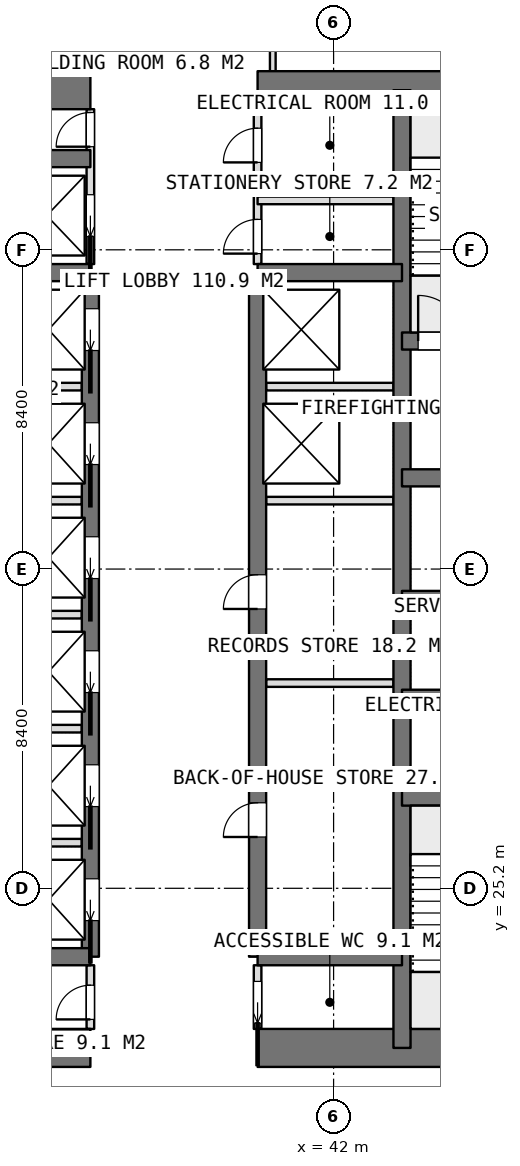
"""IFC4 building model, lengths in metres.
Left out: names, types, materials, properties, quantities, classifications, styles, units other than length and angle.
Written with IfcOpenShell. Run it as: python <this file> out.ifc"""

import sys

from ifc_helpers import new_model, si_unit, direction, frame, frame_2d, origin, place, context, subcontext, project, spatial, rectangle, extrude, element, fill, save


model = new_model("IFC4")
c1 = context("Model", 3, precision=1e-05, world=origin(), true_north=direction((0.0, 1.0)))
c2 = subcontext(c1, "Body", "Model", "MODEL_VIEW")
j1 = project(units=[si_unit("LENGTHUNIT", "METRE"), si_unit("PLANEANGLEUNIT", "RADIAN")], contexts=[c1])
p1 = place(None, origin())
s1 = spatial("IfcSite", under=j1, at=p1, CompositionType="ELEMENT")
p2 = place(p1, origin())
s2 = spatial("IfcBuilding", under=s1, at=p2, CompositionType="ELEMENT")
p3 = place(p2, frame((0.0, 0.0, 191.45)))
s3 = spatial("IfcBuildingStorey", under=s2, at=p3, CompositionType="ELEMENT", Elevation=191.45)
p4 = place(p3, frame((25.2, 21.0, 0.0), z_axis=(0.0, 0.0, 1.0), x_axis=(1.0, 0.0, 0.0)))
e1 = element("IfcWall", 1, at=p4, inside=s3, PredefinedType="SHEAR", context=c2, shape_type="SweptSolid", body=[
    extrude(rectangle(XDim=10.4, YDim=1.0, at=frame_2d((5.2, 0.0))), origin(), (0.0, 0.0, 1.0), 3.75),
])
p5 = place(p3, frame((40.0, 21.0, 0.0), z_axis=(0.0, 0.0, 1.0), x_axis=(1.0, 0.0, 0.0)))
e2 = element("IfcWall", 2, at=p5, inside=s3, PredefinedType="SHEAR", context=c2, shape_type="SweptSolid", body=[
    extrude(rectangle(XDim=10.4, YDim=1.0, at=frame_2d((5.2, 0.0))), origin(), (0.0, 0.0, 1.0), 3.75),
])
p6 = place(p3, frame((25.2, 46.2, 0.0), z_axis=(0.0, 0.0, 1.0), x_axis=(1.0, 0.0, 0.0)))
e3 = element("IfcWall", 3, at=p6, inside=s3, PredefinedType="SHEAR", context=c2, shape_type="SweptSolid", body=[
    extrude(rectangle(XDim=10.4, YDim=1.0, at=frame_2d((5.2, 0.0))), origin(), (0.0, 0.0, 1.0), 3.75),
])
p7 = place(p3, frame((40.0, 46.2, 0.0), z_axis=(0.0, 0.0, 1.0), x_axis=(1.0, 0.0, 0.0)))
e4 = element("IfcWall", 4, at=p7, inside=s3, PredefinedType="SHEAR", context=c2, shape_type="SweptSolid", body=[
    extrude(rectangle(XDim=10.4, YDim=1.0, at=frame_2d((5.2, 0.0))), origin(), (0.0, 0.0, 1.0), 3.75),
])
p8 = place(p3, frame((43.8, 21.0, 0.0), z_axis=(0.0, 0.0, 1.0), x_axis=(0.0, 1.0, 0.0)))
e5 = element("IfcWall", 5, at=p8, inside=s3, PredefinedType="SHEAR", context=c2, shape_type="SweptSolid", body=[
    extrude(rectangle(XDim=25.2, YDim=0.45, at=frame_2d((12.6, 0.0))), origin(), (0.0, 0.0, 1.0), 3.75),
])
p9 = place(p3, frame((35.6, 23.4, 0.0), z_axis=(0.0, 0.0, 1.0), x_axis=(0.0, 1.0, 0.0)))
e6 = element("IfcWall", 6, at=p9, inside=s3, PredefinedType="SHEAR", context=c2, shape_type="SweptSolid", body=[
    extrude(rectangle(XDim=18.0, YDim=0.45, at=frame_2d((9.0, 0.0))), origin(), (0.0, 0.0, 1.0), 3.75),
])
p10 = place(p9, frame((0.95, 0.0, 0.0)))
e7 = element("IfcOpeningElement", 7, at=p10, cuts=e6, PredefinedType="OPENING", context=c2, shape_type="SweptSolid", body=[
    extrude(rectangle(XDim=1.1, YDim=2.1, at=frame_2d((0.55, 1.05))), frame((0.0, 0.235, 0.0), z_axis=(0.0, -1.0, 0.0), x_axis=(1.0, 0.0, 0.0)), (0.0, 0.0, 1.0), 0.47),
])
p11 = place(p9, frame((3.95, 0.0, 0.0)))
e8 = element("IfcOpeningElement", 8, at=p11, cuts=e6, PredefinedType="OPENING", context=c2, shape_type="SweptSolid", body=[
    extrude(rectangle(XDim=1.1, YDim=2.1, at=frame_2d((0.55, 1.05))), frame((0.0, 0.235, 0.0), z_axis=(0.0, -1.0, 0.0), x_axis=(1.0, 0.0, 0.0)), (0.0, 0.0, 1.0), 0.47),
])
p12 = place(p9, frame((6.95, 0.0, 0.0)))
e9 = element("IfcOpeningElement", 9, at=p12, cuts=e6, PredefinedType="OPENING", context=c2, shape_type="SweptSolid", body=[
    extrude(rectangle(XDim=1.1, YDim=2.1, at=frame_2d((0.55, 1.05))), frame((0.0, 0.235, 0.0), z_axis=(0.0, -1.0, 0.0), x_axis=(1.0, 0.0, 0.0)), (0.0, 0.0, 1.0), 0.47),
])
p13 = place(p9, frame((9.95, 0.0, 0.0)))
e10 = element("IfcOpeningElement", 10, at=p13, cuts=e6, PredefinedType="OPENING", context=c2, shape_type="SweptSolid", body=[
    extrude(rectangle(XDim=1.1, YDim=2.1, at=frame_2d((0.55, 1.05))), frame((0.0, 0.235, 0.0), z_axis=(0.0, -1.0, 0.0), x_axis=(1.0, 0.0, 0.0)), (0.0, 0.0, 1.0), 0.47),
])
p14 = place(p9, frame((12.95, 0.0, 0.0)))
e11 = element("IfcOpeningElement", 11, at=p14, cuts=e6, PredefinedType="OPENING", context=c2, shape_type="SweptSolid", body=[
    extrude(rectangle(XDim=1.1, YDim=2.1, at=frame_2d((0.55, 1.05))), frame((0.0, 0.235, 0.0), z_axis=(0.0, -1.0, 0.0), x_axis=(1.0, 0.0, 0.0)), (0.0, 0.0, 1.0), 0.47),
])
p15 = place(p9, frame((15.95, 0.0, 0.0)))
e12 = element("IfcOpeningElement", 12, at=p15, cuts=e6, PredefinedType="OPENING", context=c2, shape_type="SweptSolid", body=[
    extrude(rectangle(XDim=1.1, YDim=2.1, at=frame_2d((0.55, 1.05))), frame((0.0, 0.235, 0.0), z_axis=(0.0, -1.0, 0.0), x_axis=(1.0, 0.0, 0.0)), (0.0, 0.0, 1.0), 0.47),
])
p16 = place(p3, frame((40.0, 23.4, 0.0), z_axis=(0.0, 0.0, 1.0), x_axis=(0.0, 1.0, 0.0)))
e13 = element("IfcWall", 13, at=p16, inside=s3, PredefinedType="SHEAR", context=c2, shape_type="SweptSolid", body=[
    extrude(rectangle(XDim=18.0, YDim=0.45, at=frame_2d((9.0, 0.0))), origin(), (0.0, 0.0, 1.0), 3.75),
])
p17 = place(p16, frame((3.15, 0.0, 0.0)))
e14 = element("IfcOpeningElement", 14, at=p17, cuts=e13, PredefinedType="OPENING", context=c2, shape_type="SweptSolid", body=[
    extrude(rectangle(XDim=0.9, YDim=2.1, at=frame_2d((0.45, 1.05))), frame((0.0, 0.235, 0.0), z_axis=(0.0, -1.0, 0.0), x_axis=(1.0, 0.0, 0.0)), (0.0, 0.0, 1.0), 0.47),
])
p18 = place(p16, frame((9.15, 0.0, 0.0)))
e15 = element("IfcOpeningElement", 15, at=p18, cuts=e13, PredefinedType="OPENING", context=c2, shape_type="SweptSolid", body=[
    extrude(rectangle(XDim=0.9, YDim=2.1, at=frame_2d((0.45, 1.05))), frame((0.0, 0.235, 0.0), z_axis=(0.0, -1.0, 0.0), x_axis=(1.0, 0.0, 0.0)), (0.0, 0.0, 1.0), 0.47),
])
for number, where, z_axis, x_axis in (
    (16, (31.8, 23.4, 0.0), (0.0, 0.0, 1.0), (1.0, 0.0, 0.0)),
    (17, (31.8, 41.4, 0.0), (0.0, 0.0, 1.0), (1.0, 0.0, 0.0)),
    (18, (31.8, 44.4, 0.0), (0.0, 0.0, 1.0), (1.0, 0.0, 0.0)),
    (19, (40.0, 23.4, 0.0), (0.0, 0.0, 1.0), (1.0, 0.0, 0.0)),
    (20, (40.0, 41.4, 0.0), (0.0, 0.0, 1.0), (1.0, 0.0, 0.0)),
):
    element("IfcWall", number, at=place(p3, frame(where, z_axis=z_axis, x_axis=x_axis)), inside=s3, PredefinedType="SHEAR", context=c2, shape_type="SweptSolid", body=[
        extrude(rectangle(XDim=3.8, YDim=0.45, at=frame_2d((1.9, 0.0))), origin(), (0.0, 0.0, 1.0), 3.75),
    ])
for number, where, z_axis, x_axis in (
    (21, (43.8, 27.6, 0.0), (0.0, 0.0, 1.0), (1.0, 0.0, 0.0)),
    (22, (43.8, 30.2, 0.0), (0.0, 0.0, 1.0), (1.0, 0.0, 0.0)),
    (23, (43.8, 32.8, 0.0), (0.0, 0.0, 1.0), (1.0, 0.0, 0.0)),
):
    element("IfcWall", number, at=place(p3, frame(where, z_axis=z_axis, x_axis=x_axis)), inside=s3, PredefinedType="SHEAR", context=c2, shape_type="SweptSolid", body=[
        extrude(rectangle(XDim=6.6, YDim=0.45, at=frame_2d((3.3, 0.0))), origin(), (0.0, 0.0, 1.0), 3.75),
    ])
p19 = place(p3, frame((43.8, 36.0, 0.0), z_axis=(0.0, 0.0, 1.0), x_axis=(1.0, 0.0, 0.0)))
e24 = element("IfcWall", 24, at=p19, inside=s3, PredefinedType="SHEAR", context=c2, shape_type="SweptSolid", body=[
    extrude(rectangle(XDim=6.6, YDim=0.45, at=frame_2d((3.3, 0.0))), origin(), (0.0, 0.0, 1.0), 3.75),
])
p20 = place(p19, frame((2.65, 0.0, 0.0)))
e25 = element("IfcOpeningElement", 25, at=p20, cuts=e24, PredefinedType="OPENING", context=c2, shape_type="SweptSolid", body=[
    extrude(rectangle(XDim=1.3, YDim=2.1, at=frame_2d((0.65, 1.05))), frame((0.0, 0.235, 0.0), z_axis=(0.0, -1.0, 0.0), x_axis=(1.0, 0.0, 0.0)), (0.0, 0.0, 1.0), 0.47),
])
p21 = place(p3, frame((43.8, 39.6, 0.0), z_axis=(0.0, 0.0, 1.0), x_axis=(1.0, 0.0, 0.0)))
e26 = element("IfcWall", 26, at=p21, inside=s3, PredefinedType="SHEAR", context=c2, shape_type="SweptSolid", body=[
    extrude(rectangle(XDim=6.6, YDim=0.45, at=frame_2d((3.3, 0.0))), origin(), (0.0, 0.0, 1.0), 3.75),
])
p22 = place(p21, frame((0.425, 0.0, 0.0)))
e27 = element("IfcOpeningElement", 27, at=p22, cuts=e26, PredefinedType="OPENING", context=c2, shape_type="SweptSolid", body=[
    extrude(rectangle(XDim=1.2, YDim=2.1, at=frame_2d((0.6, 1.05))), frame((0.0, 0.235, 0.0), z_axis=(0.0, -1.0, 0.0), x_axis=(1.0, 0.0, 0.0)), (0.0, 0.0, 1.0), 0.47),
])
for number, where, z_axis, x_axis in (
    (28, (32.025, 26.4, 0.0), (0.0, 0.0, 1.0), (1.0, 0.0, 0.0)),
    (29, (32.025, 29.4, 0.0), (0.0, 0.0, 1.0), (1.0, 0.0, 0.0)),
    (30, (32.025, 32.4, 0.0), (0.0, 0.0, 1.0), (1.0, 0.0, 0.0)),
    (31, (32.025, 35.4, 0.0), (0.0, 0.0, 1.0), (1.0, 0.0, 0.0)),
    (32, (32.025, 38.4, 0.0), (0.0, 0.0, 1.0), (1.0, 0.0, 0.0)),
):
    element("IfcWall", number, at=place(p3, frame(where, z_axis=z_axis, x_axis=x_axis)), inside=s3, PredefinedType="PARTITIONING", context=c2, shape_type="SweptSolid", body=[
        extrude(rectangle(XDim=3.35, YDim=0.2, at=frame_2d((1.675, 0.0))), origin(), (0.0, 0.0, 1.0), 3.5),
    ])
for number, where, z_axis, x_axis in (
    (33, (40.225, 35.4, 0.0), (0.0, 0.0, 1.0), (1.0, 0.0, 0.0)),
    (34, (40.225, 38.4, 0.0), (0.0, 0.0, 1.0), (1.0, 0.0, 0.0)),
):
    element("IfcWall", number, at=place(p3, frame(where, z_axis=z_axis, x_axis=x_axis)), inside=s3, PredefinedType="PARTITIONING", context=c2, shape_type="SweptSolid", body=[
        extrude(rectangle(XDim=3.35, YDim=0.2, at=frame_2d((1.675, 0.0))), origin(), (0.0, 0.0, 1.0), 3.5),
    ])
p23 = place(p3, frame((40.0, 21.5, 0.0), z_axis=(0.0, 0.0, 1.0), x_axis=(0.0, 1.0, 0.0)))
e35 = element("IfcWall", 35, at=p23, inside=s3, PredefinedType="PARTITIONING", context=c2, shape_type="SweptSolid", body=[
    extrude(rectangle(XDim=1.675, YDim=0.2, at=frame_2d((0.837, 0.0))), origin(), (0.0, 0.0, 1.0), 3.5),
])
p24 = place(p23, frame((0.15, 0.0, 0.0)))
e36 = element("IfcOpeningElement", 36, at=p24, cuts=e35, PredefinedType="OPENING", context=c2, shape_type="SweptSolid", body=[
    extrude(rectangle(XDim=1.1, YDim=2.1, at=frame_2d((0.55, 1.05))), frame((0.0, 0.11, 0.0), z_axis=(0.0, -1.0, 0.0), x_axis=(1.0, 0.0, 0.0)), (0.0, 0.0, 1.0), 0.22),
])
p25 = place(p3, frame((40.0, 41.625, 0.0), z_axis=(0.0, 0.0, 1.0), x_axis=(0.0, 1.0, 0.0)))
e37 = element("IfcWall", 37, at=p25, inside=s3, PredefinedType="PARTITIONING", context=c2, shape_type="SweptSolid", body=[
    extrude(rectangle(XDim=4.075, YDim=0.2, at=frame_2d((2.038, 0.0))), origin(), (0.0, 0.0, 1.0), 3.5),
])
p26 = place(p25, frame((2.675, 0.0, 0.0)))
e38 = element("IfcOpeningElement", 38, at=p26, cuts=e37, PredefinedType="OPENING", context=c2, shape_type="SweptSolid", body=[
    extrude(rectangle(XDim=0.9, YDim=2.1, at=frame_2d((0.45, 1.05))), frame((0.0, 0.11, 0.0), z_axis=(0.0, -1.0, 0.0), x_axis=(1.0, 0.0, 0.0)), (0.0, 0.0, 1.0), 0.22),
])
p27 = place(p25, frame((0.275, 0.0, 0.0)))
e39 = element("IfcOpeningElement", 39, at=p27, cuts=e37, PredefinedType="OPENING", context=c2, shape_type="SweptSolid", body=[
    extrude(rectangle(XDim=0.9, YDim=2.1, at=frame_2d((0.45, 1.05))), frame((0.0, 0.11, 0.0), z_axis=(0.0, -1.0, 0.0), x_axis=(1.0, 0.0, 0.0)), (0.0, 0.0, 1.0), 0.22),
])
p28 = place(p3, frame((35.6, 41.625, 0.0), z_axis=(0.0, 0.0, 1.0), x_axis=(0.0, 1.0, 0.0)))
e40 = element("IfcWall", 40, at=p28, inside=s3, PredefinedType="PARTITIONING", context=c2, shape_type="SweptSolid", body=[
    extrude(rectangle(XDim=4.075, YDim=0.2, at=frame_2d((2.038, 0.0))), origin(), (0.0, 0.0, 1.0), 3.5),
])
p29 = place(p28, frame((3.088, 0.0, 0.0)))
e41 = element("IfcOpeningElement", 41, at=p29, cuts=e40, PredefinedType="OPENING", context=c2, shape_type="SweptSolid", body=[
    extrude(rectangle(XDim=0.9, YDim=2.1, at=frame_2d((0.45, 1.05))), frame((0.0, 0.11, 0.0), z_axis=(0.0, -1.0, 0.0), x_axis=(1.0, 0.0, 0.0)), (0.0, 0.0, 1.0), 0.22),
])
p30 = place(p28, frame((0.725, 0.0, 0.0)))
e42 = element("IfcOpeningElement", 42, at=p30, cuts=e40, PredefinedType="OPENING", context=c2, shape_type="SweptSolid", body=[
    extrude(rectangle(XDim=1.1, YDim=2.1, at=frame_2d((0.55, 1.05))), frame((0.0, 0.11, 0.0), z_axis=(0.0, -1.0, 0.0), x_axis=(1.0, 0.0, 0.0)), (0.0, 0.0, 1.0), 0.22),
])
p31 = place(p3, frame((35.6, 21.5, 0.0), z_axis=(0.0, 0.0, 1.0), x_axis=(0.0, 1.0, 0.0)))
e43 = element("IfcWall", 43, at=p31, inside=s3, PredefinedType="PARTITIONING", context=c2, shape_type="SweptSolid", body=[
    extrude(rectangle(XDim=1.675, YDim=0.2, at=frame_2d((0.837, 0.0))), origin(), (0.0, 0.0, 1.0), 3.5),
])
p32 = place(p31, frame((0.25, 0.0, 0.0)))
e44 = element("IfcOpeningElement", 44, at=p32, cuts=e43, PredefinedType="OPENING", context=c2, shape_type="SweptSolid", body=[
    extrude(rectangle(XDim=0.9, YDim=2.1, at=frame_2d((0.45, 1.05))), frame((0.0, 0.11, 0.0), z_axis=(0.0, -1.0, 0.0), x_axis=(1.0, 0.0, 0.0)), (0.0, 0.0, 1.0), 0.22),
])
p33 = place(p3, frame((40.225, 30.6, 0.0), z_axis=(0.0, 0.0, 1.0), x_axis=(1.0, 0.0, 0.0)))
e45 = element("IfcWall", 45, at=p33, inside=s3, PredefinedType="PARTITIONING", context=c2, shape_type="SweptSolid", body=[
    extrude(rectangle(XDim=3.35, YDim=0.2, at=frame_2d((1.675, 0.0))), origin(), (0.0, 0.0, 1.0), 3.5),
])
p34 = place(p3, frame((40.0, 43.3, 0.0), z_axis=(0.0, 0.0, 1.0), x_axis=(1.0, 0.0, 0.0)))
e46 = element("IfcWall", 46, at=p34, inside=s3, PredefinedType="PARTITIONING", context=c2, shape_type="SweptSolid", body=[
    extrude(rectangle(XDim=3.575, YDim=0.2, at=frame_2d((1.788, 0.0))), origin(), (0.0, 0.0, 1.0), 3.5),
])
for number, where, z_axis, x_axis in (
    (47, (40.4, 46.7, 0.0), (0.0, 0.0, 1.0), (0.0, 1.0, 0.0)),
    (48, (35.2, 46.7, 0.0), (0.0, 0.0, 1.0), (0.0, 1.0, 0.0)),
):
    element("IfcWall", number, at=place(p3, frame(where, z_axis=z_axis, x_axis=x_axis)), inside=s3, PredefinedType="PARTITIONING", context=c2, shape_type="SweptSolid", body=[
        extrude(rectangle(XDim=2.625, YDim=0.15, at=frame_2d((1.312, 0.0))), origin(), (0.0, 0.0, 1.0), 3.5),
    ])
p35 = place(p24, origin())
e49 = element("IfcDoor", 49, at=p35, inside=s3, OperationType="SLIDING_TO_LEFT", PredefinedType="DOOR", context=c2, shape_type="SweptSolid", body=[
    extrude(rectangle(XDim=1.1, YDim=2.1, at=frame_2d((0.55, 1.05))), frame((0.0, 0.025, 0.0), z_axis=(0.0, -1.0, 0.0), x_axis=(1.0, 0.0, 0.0)), (0.0, 0.0, 1.0), 0.05),
])
fill(e36, e49)
p36 = place(p32, origin())
e50 = element("IfcDoor", 50, at=p36, inside=s3, OperationType="SINGLE_SWING_LEFT", PredefinedType="DOOR", context=c2, shape_type="SweptSolid", body=[
    extrude(rectangle(XDim=0.9, YDim=2.1, at=frame_2d((0.45, 1.05))), frame((0.0, 0.025, 0.0), z_axis=(0.0, -1.0, 0.0), x_axis=(1.0, 0.0, 0.0)), (0.0, 0.0, 1.0), 0.05),
])
fill(e44, e50)
p37 = place(p26, origin())
e51 = element("IfcDoor", 51, at=p37, inside=s3, OperationType="SINGLE_SWING_LEFT", PredefinedType="DOOR", context=c2, shape_type="SweptSolid", body=[
    extrude(rectangle(XDim=0.9, YDim=2.1, at=frame_2d((0.45, 1.05))), frame((0.0, 0.025, 0.0), z_axis=(0.0, -1.0, 0.0), x_axis=(1.0, 0.0, 0.0)), (0.0, 0.0, 1.0), 0.05),
])
fill(e38, e51)
p38 = place(p27, origin())
e52 = element("IfcDoor", 52, at=p38, inside=s3, OperationType="SINGLE_SWING_LEFT", PredefinedType="DOOR", context=c2, shape_type="SweptSolid", body=[
    extrude(rectangle(XDim=0.9, YDim=2.1, at=frame_2d((0.45, 1.05))), frame((0.0, 0.025, 0.0), z_axis=(0.0, -1.0, 0.0), x_axis=(1.0, 0.0, 0.0)), (0.0, 0.0, 1.0), 0.05),
])
fill(e39, e52)
p39 = place(p17, origin())
e53 = element("IfcDoor", 53, at=p39, inside=s3, OperationType="SINGLE_SWING_LEFT", PredefinedType="DOOR", context=c2, shape_type="SweptSolid", body=[
    extrude(rectangle(XDim=0.9, YDim=2.1, at=frame_2d((0.45, 1.05))), frame((0.0, 0.025, 0.0), z_axis=(0.0, -1.0, 0.0), x_axis=(1.0, 0.0, 0.0)), (0.0, 0.0, 1.0), 0.05),
])
fill(e14, e53)
p40 = place(p18, origin())
e54 = element("IfcDoor", 54, at=p40, inside=s3, OperationType="SINGLE_SWING_LEFT", PredefinedType="DOOR", context=c2, shape_type="SweptSolid", body=[
    extrude(rectangle(XDim=0.9, YDim=2.1, at=frame_2d((0.45, 1.05))), frame((0.0, 0.025, 0.0), z_axis=(0.0, -1.0, 0.0), x_axis=(1.0, 0.0, 0.0)), (0.0, 0.0, 1.0), 0.05),
])
fill(e15, e54)
p41 = place(p29, origin())
e55 = element("IfcDoor", 55, at=p41, inside=s3, OperationType="SINGLE_SWING_LEFT", PredefinedType="DOOR", context=c2, shape_type="SweptSolid", body=[
    extrude(rectangle(XDim=0.9, YDim=2.1, at=frame_2d((0.45, 1.05))), frame((0.0, 0.025, 0.0), z_axis=(0.0, -1.0, 0.0), x_axis=(1.0, 0.0, 0.0)), (0.0, 0.0, 1.0), 0.05),
])
fill(e41, e55)
p42 = place(p10, origin())
e56 = element("IfcDoor", 56, at=p42, inside=s3, OperationType="SLIDING_TO_LEFT", PredefinedType="USERDEFINED", context=c2, shape_type="SweptSolid", body=[
    extrude(rectangle(XDim=1.1, YDim=2.1, at=frame_2d((0.55, 1.05))), frame((0.0, 0.025, 0.0), z_axis=(0.0, -1.0, 0.0), x_axis=(1.0, 0.0, 0.0)), (0.0, 0.0, 1.0), 0.05),
])
fill(e7, e56)
p43 = place(p11, origin())
e57 = element("IfcDoor", 57, at=p43, inside=s3, OperationType="SLIDING_TO_LEFT", PredefinedType="USERDEFINED", context=c2, shape_type="SweptSolid", body=[
    extrude(rectangle(XDim=1.1, YDim=2.1, at=frame_2d((0.55, 1.05))), frame((0.0, 0.025, 0.0), z_axis=(0.0, -1.0, 0.0), x_axis=(1.0, 0.0, 0.0)), (0.0, 0.0, 1.0), 0.05),
])
fill(e8, e57)
p44 = place(p12, origin())
e58 = element("IfcDoor", 58, at=p44, inside=s3, OperationType="SLIDING_TO_LEFT", PredefinedType="USERDEFINED", context=c2, shape_type="SweptSolid", body=[
    extrude(rectangle(XDim=1.1, YDim=2.1, at=frame_2d((0.55, 1.05))), frame((0.0, 0.025, 0.0), z_axis=(0.0, -1.0, 0.0), x_axis=(1.0, 0.0, 0.0)), (0.0, 0.0, 1.0), 0.05),
])
fill(e9, e58)
p45 = place(p13, origin())
e59 = element("IfcDoor", 59, at=p45, inside=s3, OperationType="SLIDING_TO_LEFT", PredefinedType="USERDEFINED", context=c2, shape_type="SweptSolid", body=[
    extrude(rectangle(XDim=1.1, YDim=2.1, at=frame_2d((0.55, 1.05))), frame((0.0, 0.025, 0.0), z_axis=(0.0, -1.0, 0.0), x_axis=(1.0, 0.0, 0.0)), (0.0, 0.0, 1.0), 0.05),
])
fill(e10, e59)
p46 = place(p14, origin())
e60 = element("IfcDoor", 60, at=p46, inside=s3, OperationType="SLIDING_TO_LEFT", PredefinedType="USERDEFINED", context=c2, shape_type="SweptSolid", body=[
    extrude(rectangle(XDim=1.1, YDim=2.1, at=frame_2d((0.55, 1.05))), frame((0.0, 0.025, 0.0), z_axis=(0.0, -1.0, 0.0), x_axis=(1.0, 0.0, 0.0)), (0.0, 0.0, 1.0), 0.05),
])
fill(e11, e60)
p47 = place(p15, origin())
e61 = element("IfcDoor", 61, at=p47, inside=s3, OperationType="SLIDING_TO_LEFT", PredefinedType="USERDEFINED", context=c2, shape_type="SweptSolid", body=[
    extrude(rectangle(XDim=1.1, YDim=2.1, at=frame_2d((0.55, 1.05))), frame((0.0, 0.025, 0.0), z_axis=(0.0, -1.0, 0.0), x_axis=(1.0, 0.0, 0.0)), (0.0, 0.0, 1.0), 0.05),
])
fill(e12, e61)
p48 = place(p30, origin())
e62 = element("IfcDoor", 62, at=p48, inside=s3, OperationType="SLIDING_TO_LEFT", PredefinedType="USERDEFINED", context=c2, shape_type="SweptSolid", body=[
    extrude(rectangle(XDim=1.1, YDim=2.1, at=frame_2d((0.55, 1.05))), frame((0.0, 0.025, 0.0), z_axis=(0.0, -1.0, 0.0), x_axis=(1.0, 0.0, 0.0)), (0.0, 0.0, 1.0), 0.05),
])
fill(e42, e62)
p49 = place(p22, origin())
e63 = element("IfcDoor", 63, at=p49, inside=s3, OperationType="SINGLE_SWING_RIGHT", PredefinedType="DOOR", context=c2, shape_type="SweptSolid", body=[
    extrude(rectangle(XDim=1.2, YDim=2.1, at=frame_2d((0.6, 1.05))), frame((0.0, 0.025, 0.0), z_axis=(0.0, -1.0, 0.0), x_axis=(1.0, 0.0, 0.0)), (0.0, 0.0, 1.0), 0.05),
])
fill(e27, e63)
save(model, sys.argv[1])
